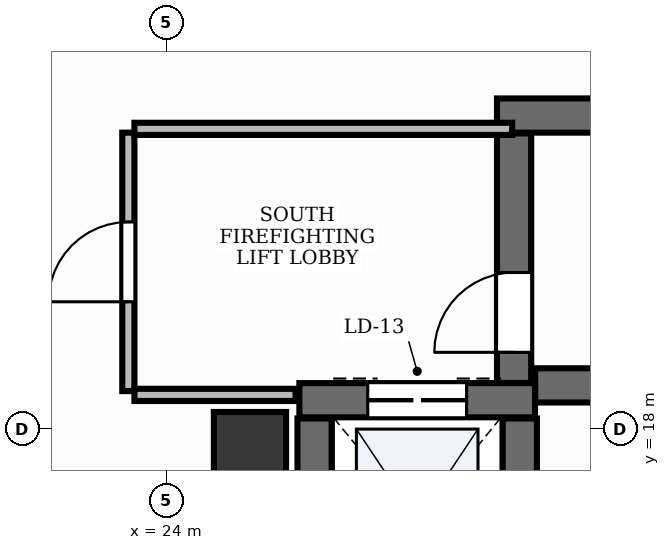
"""IFC4 building model, lengths in metres.
Left out: names, types, materials, properties, quantities, classifications, styles, units other than length and angle.
Written with IfcOpenShell. Run it as: python <this file> out.ifc"""

import sys

from ifc_helpers import new_model, si_unit, direction, frame, frame_2d, origin, origin_2d, place, context, subcontext, project, spatial, rectangle, extrude, element, fill, save


model = new_model("IFC4")
c1 = context("Model", 3, precision=1e-05, world=origin(), true_north=direction((0.0, 1.0)))
c2 = subcontext(c1, "Body", "Model", "MODEL_VIEW")
j1 = project(units=[si_unit("LENGTHUNIT", "METRE"), si_unit("PLANEANGLEUNIT", "RADIAN")], contexts=[c1])
p1 = place(None, origin())
s1 = spatial("IfcSite", under=j1, at=p1, CompositionType="ELEMENT")
p2 = place(p1, origin())
s2 = spatial("IfcBuilding", under=s1, at=p2, CompositionType="ELEMENT")
p3 = place(p2, frame((0.0, 0.0, 72.0)))
s3 = spatial("IfcBuildingStorey", under=s2, at=p3, CompositionType="ELEMENT", Elevation=72.0)
p4 = place(p3, frame((28.852, 18.575, 0.0), z_axis=(0.0, 0.0, 1.0), x_axis=(1.0, 0.0, 0.0)))
e1 = element("IfcWall", 1, at=p4, inside=s3, PredefinedType="SHEAR", context=c2, shape_type="SweptSolid", body=[
    extrude(rectangle(XDim=8.248, YDim=0.45, at=frame_2d((4.124, 0.0))), origin(), (0.0, 0.0, 1.0), 3.9),
])
p5 = place(p3, frame((28.35, 22.125, 0.0), z_axis=(0.0, 0.0, 1.0), x_axis=(1.0, 0.0, 0.0)))
e2 = element("IfcWall", 2, at=p5, inside=s3, PredefinedType="SHEAR", context=c2, shape_type="SweptSolid", body=[
    extrude(rectangle(XDim=8.75, YDim=0.45, at=frame_2d((4.375, 0.0))), origin(), (0.0, 0.0, 1.0), 3.9),
])
p6 = place(p3, frame((28.575, 18.607, 0.0), z_axis=(0.0, 0.0, 1.0), x_axis=(0.0, 1.0, 0.0)))
e3 = element("IfcWall", 3, at=p6, inside=s3, PredefinedType="SHEAR", context=c2, shape_type="SweptSolid", body=[
    extrude(rectangle(XDim=3.283, YDim=0.45, at=frame_2d((1.642, 0.0))), origin(), (0.0, 0.0, 1.0), 3.9),
])
p7 = place(p6, frame((0.403, 0.0, 0.0)))
e4 = element("IfcOpeningElement", 4, at=p7, cuts=e3, PredefinedType="OPENING", context=c2, shape_type="SweptSolid", body=[
    extrude(rectangle(XDim=1.05, YDim=2.15, at=frame_2d((0.525, 1.075))), frame((0.0, 0.24, 0.0), z_axis=(0.0, -1.0, 0.0), x_axis=(1.0, 0.0, 0.0)), (0.0, 0.0, 1.0), 0.48),
])
p8 = place(p3, frame((25.75, 18.38, 0.0), z_axis=(0.0, 0.0, 1.0), x_axis=(1.0, 0.0, 0.0)))
e5 = element("IfcWall", 5, at=p8, inside=s3, PredefinedType="SHEAR", context=c2, shape_type="SweptSolid", body=[
    extrude(rectangle(XDim=3.1, YDim=0.45, at=frame_2d((1.55, 0.0))), origin(), (0.0, 0.0, 1.0), 3.9),
])
p9 = place(p8, frame((0.9, 0.0, 0.0)))
e6 = element("IfcOpeningElement", 6, at=p9, cuts=e5, PredefinedType="OPENING", context=c2, shape_type="SweptSolid", body=[
    extrude(rectangle(XDim=1.3, YDim=2.2, at=frame_2d((0.65, 1.1))), frame((0.0, 0.24, 0.0), z_axis=(0.0, -1.0, 0.0), x_axis=(1.0, 0.0, 0.0)), (0.0, 0.0, 1.0), 0.48),
])
for number, where, z_axis, x_axis in (
    (7, (25.95, 15.44, 0.0), (0.0, 0.0, 1.0), (0.0, 1.0, 0.0)),
    (8, (28.65, 15.44, 0.0), (0.0, 0.0, 1.0), (0.0, 1.0, 0.0)),
):
    element("IfcWall", number, at=place(p3, frame(where, z_axis=z_axis, x_axis=x_axis)), inside=s3, PredefinedType="SHEAR", context=c2, shape_type="SweptSolid", body=[
        extrude(rectangle(XDim=2.7, YDim=0.45, at=frame_2d((1.35, 0.0))), origin(), (0.0, 0.0, 1.0), 3.9),
    ])
p10 = place(p3, frame((25.1, 17.75, -0.0), z_axis=(0.0, 0.0, 1.0), x_axis=(1.0, 0.0, 0.0)))
e9 = element("IfcColumn", 9, at=p10, inside=s3, PredefinedType="PILASTER", context=c2, shape_type="SweptSolid", body=[
    extrude(rectangle(XDim=0.95, YDim=0.95, at=origin_2d()), origin(), (0.0, 0.0, 1.0), 3.901),
])
p11 = place(p3, frame((23.5, 18.5, 0.0), z_axis=(0.0, 0.0, 1.0), x_axis=(0.0, 1.0, 0.0)))
e10 = element("IfcWall", 10, at=p11, inside=s3, PredefinedType="PARTITIONING", context=c2, shape_type="SweptSolid", body=[
    extrude(rectangle(XDim=3.4, YDim=0.16, at=frame_2d((1.7, 0.0))), origin(), (0.0, 0.0, 1.0), 2.91),
])
p12 = place(p11, frame((1.175, 0.0, 0.0)))
e11 = element("IfcOpeningElement", 11, at=p12, cuts=e10, PredefinedType="OPENING", context=c2, shape_type="SweptSolid", body=[
    extrude(rectangle(XDim=1.05, YDim=2.15, at=frame_2d((0.525, 1.075))), frame((0.0, 0.095, 0.0), z_axis=(0.0, -1.0, 0.0), x_axis=(1.0, 0.0, 0.0)), (0.0, 0.0, 1.0), 0.19),
])
p13 = place(p3, frame((23.58, 21.95, 0.0), z_axis=(0.0, 0.0, 1.0), x_axis=(1.0, 0.0, 0.0)))
e12 = element("IfcWall", 12, at=p13, inside=s3, PredefinedType="PARTITIONING", context=c2, shape_type="SweptSolid", body=[
    extrude(rectangle(XDim=4.97, YDim=0.16, at=frame_2d((2.485, 0.0))), origin(), (0.0, 0.0, 1.0), 2.91),
])
p14 = place(p3, frame((23.58, 18.45, 0.0), z_axis=(0.0, 0.0, 1.0), x_axis=(1.0, 0.0, 0.0)))
e13 = element("IfcWall", 13, at=p14, inside=s3, PredefinedType="PARTITIONING", context=c2, shape_type="SweptSolid", body=[
    extrude(rectangle(XDim=2.12, YDim=0.16, at=frame_2d((1.06, 0.0))), origin(), (0.0, 0.0, 1.0), 2.91),
])
p15 = place(p7, origin())
e14 = element("IfcDoor", 14, at=p15, inside=s3, OperationType="SINGLE_SWING_LEFT", PredefinedType="DOOR", context=c2, shape_type="SweptSolid", body=[
    extrude(rectangle(XDim=1.05, YDim=2.15, at=frame_2d((0.525, 1.075))), frame((0.0, 0.025, 0.0), z_axis=(0.0, -1.0, 0.0), x_axis=(1.0, 0.0, 0.0)), (0.0, 0.0, 1.0), 0.05),
])
fill(e4, e14)
p16 = place(p9, origin())
e15 = element("IfcDoor", 15, at=p16, inside=s3, OperationType="DOUBLE_DOOR_SLIDING", PredefinedType="DOOR", context=c2, shape_type="SweptSolid", body=[
    extrude(rectangle(XDim=1.3, YDim=2.2, at=frame_2d((0.65, 1.1))), frame((0.0, 0.025, 0.0), z_axis=(0.0, -1.0, 0.0), x_axis=(1.0, 0.0, 0.0)), (0.0, 0.0, 1.0), 0.05),
])
fill(e6, e15)
p17 = place(p12, origin())
e16 = element("IfcDoor", 16, at=p17, inside=s3, OperationType="SINGLE_SWING_LEFT", PredefinedType="DOOR", context=c2, shape_type="SweptSolid", body=[
    extrude(rectangle(XDim=1.05, YDim=2.15, at=frame_2d((0.525, 1.075))), frame((0.0, 0.025, 0.0), z_axis=(0.0, -1.0, 0.0), x_axis=(1.0, 0.0, 0.0)), (0.0, 0.0, 1.0), 0.05),
])
fill(e11, e16)
save(model, sys.argv[1])
